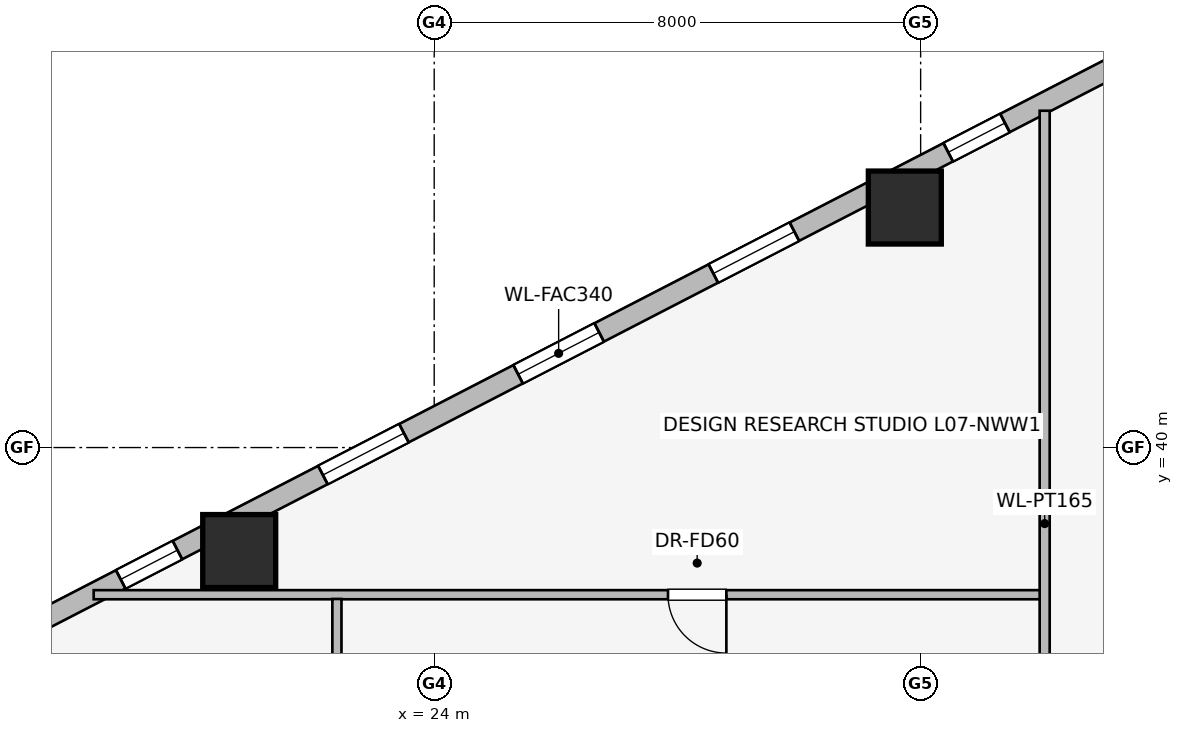
"""IFC4 building model, lengths in metres.
Left out: names, types, materials, properties, quantities, classifications, styles, units other than length and angle.
Written with IfcOpenShell. Run it as: python <this file> out.ifc"""

import sys

from ifc_helpers import new_model, si_unit, direction, frame, frame_2d, origin, origin_2d, place, context, subcontext, project, spatial, rectangle, extrude, element, fill, save


model = new_model("IFC4")
c1 = context("Model", 3, precision=1e-05, world=origin(), true_north=direction((0.0, 1.0)))
c2 = subcontext(c1, "Body", "Model", "MODEL_VIEW")
j1 = project(units=[si_unit("LENGTHUNIT", "METRE"), si_unit("PLANEANGLEUNIT", "RADIAN")], contexts=[c1])
p1 = place(None, origin())
s1 = spatial("IfcSite", under=j1, at=p1, CompositionType="ELEMENT")
p2 = place(p1, origin())
s2 = spatial("IfcBuilding", under=s1, at=p2, CompositionType="ELEMENT")
p3 = place(p2, frame((0.0, 0.0, 30.65)))
s3 = spatial("IfcBuildingStorey", under=s2, at=p3, CompositionType="ELEMENT", Elevation=30.65)
for number, where, z_axis, x_axis in (
    (1, (31.74, 43.947, 0.0), (0.0, 0.0, 1.0), (1.0, 0.0, 0.0)),
    (2, (20.793, 38.298, 0.0), (0.0, 0.0, 1.0), (1.0, 0.0, 0.0)),
):
    element("IfcColumn", number, at=place(p3, frame(where, z_axis=z_axis, x_axis=x_axis)), inside=s3, PredefinedType="COLUMN", context=c2, shape_type="SweptSolid", body=[
        extrude(rectangle(XDim=1.2, YDim=1.2, at=origin_2d()), origin(), (0.0, 0.0, 1.0), 3.65),
    ])
p4 = place(p3, frame((16.924, 36.841, 0.0), z_axis=(0.0, 0.0, 1.0), x_axis=(0.888634413993, 0.458616264721, 0.0)))
e3 = element("IfcWall", 3, at=p4, inside=s3, PredefinedType="STANDARD", context=c2, shape_type="SweptSolid", body=[
    extrude(rectangle(XDim=20.531, YDim=0.34, at=frame_2d((10.266, 0.0))), origin(), (0.0, 0.0, 1.0), 2.684),
])
p5 = place(p4, frame((2.161, 0.0, 0.75)))
e4 = element("IfcOpeningElement", 4, at=p5, cuts=e3, PredefinedType="OPENING", context=c2, shape_type="SweptSolid", body=[
    extrude(rectangle(XDim=1.05, YDim=1.4, at=frame_2d((0.525, 0.7))), frame((0.0, 0.18, 0.0), z_axis=(0.0, -1.0, 0.0), x_axis=(1.0, 0.0, 0.0)), (0.0, 0.0, 1.0), 0.36),
])
p6 = place(p4, frame((5.903, 0.0, 0.75)))
e5 = element("IfcOpeningElement", 5, at=p6, cuts=e3, PredefinedType="OPENING", context=c2, shape_type="SweptSolid", body=[
    extrude(rectangle(XDim=1.5, YDim=1.5, at=frame_2d((0.75, 0.75))), frame((0.0, 0.18, 0.0), z_axis=(0.0, -1.0, 0.0), x_axis=(1.0, 0.0, 0.0)), (0.0, 0.0, 1.0), 0.36),
])
p7 = place(p4, frame((9.516, 0.0, 0.75)))
e6 = element("IfcOpeningElement", 6, at=p7, cuts=e3, PredefinedType="OPENING", context=c2, shape_type="SweptSolid", body=[
    extrude(rectangle(XDim=1.5, YDim=1.5, at=frame_2d((0.75, 0.75))), frame((0.0, 0.18, 0.0), z_axis=(0.0, -1.0, 0.0), x_axis=(1.0, 0.0, 0.0)), (0.0, 0.0, 1.0), 0.36),
])
p8 = place(p4, frame((13.129, 0.0, 0.75)))
e7 = element("IfcOpeningElement", 7, at=p8, cuts=e3, PredefinedType="OPENING", context=c2, shape_type="SweptSolid", body=[
    extrude(rectangle(XDim=1.5, YDim=1.5, at=frame_2d((0.75, 0.75))), frame((0.0, 0.18, 0.0), z_axis=(0.0, -1.0, 0.0), x_axis=(1.0, 0.0, 0.0)), (0.0, 0.0, 1.0), 0.36),
])
p9 = place(p4, frame((17.476, 0.0, 0.75)))
e8 = element("IfcOpeningElement", 8, at=p9, cuts=e3, PredefinedType="OPENING", context=c2, shape_type="SweptSolid", body=[
    extrude(rectangle(XDim=1.05, YDim=1.4, at=frame_2d((0.525, 0.7))), frame((0.0, 0.18, 0.0), z_axis=(0.0, -1.0, 0.0), x_axis=(1.0, 0.0, 0.0)), (0.0, 0.0, 1.0), 0.36),
])
p10 = place(p3, frame((34.0, 37.58, 0.0), z_axis=(0.0, 0.0, 1.0), x_axis=(-1.0, 0.0, 0.0)))
e9 = element("IfcWall", 9, at=p10, inside=s3, PredefinedType="PARTITIONING", context=c2, shape_type="SweptSolid", body=[
    extrude(rectangle(XDim=15.6, YDim=0.15, at=frame_2d((7.8, 0.0))), origin(), (0.0, 0.0, 1.0), 3.39),
])
p11 = place(p10, frame((5.195, 0.0, 0.0)))
e10 = element("IfcOpeningElement", 10, at=p11, cuts=e9, PredefinedType="OPENING", context=c2, shape_type="SweptSolid", body=[
    extrude(rectangle(XDim=0.96, YDim=2.0, at=frame_2d((0.48, 1.0))), frame((0.0, 0.085, 0.0), z_axis=(0.0, -1.0, 0.0), x_axis=(1.0, 0.0, 0.0)), (0.0, 0.0, 1.0), 0.17),
])
p12 = place(p3, frame((34.04, 31.96, 0.0), z_axis=(0.0, 0.0, 1.0), x_axis=(0.0, 1.0, 0.0)))
e11 = element("IfcWall", 11, at=p12, inside=s3, PredefinedType="PARTITIONING", context=c2, shape_type="SweptSolid", body=[
    extrude(rectangle(XDim=13.579, YDim=0.165, at=frame_2d((6.79, 0.0))), origin(), (0.0, 0.0, 1.0), 3.39),
])
p13 = place(p3, frame((22.4, 36.08, 0.0), z_axis=(0.0, 0.0, 1.0), x_axis=(0.0, 1.0, 0.0)))
e12 = element("IfcWall", 12, at=p13, inside=s3, PredefinedType="PARTITIONING", context=c2, shape_type="SweptSolid", body=[
    extrude(rectangle(XDim=1.43, YDim=0.15, at=frame_2d((0.715, 0.0))), origin(), (0.0, 0.0, 1.0), 3.39),
])
p14 = place(p5, origin())
e13 = element("IfcWindow", 13, at=p14, inside=s3, PartitioningType="SINGLE_PANEL", PredefinedType="WINDOW", context=c2, shape_type="SweptSolid", body=[
    extrude(rectangle(XDim=1.05, YDim=1.4, at=frame_2d((0.525, 0.7))), frame((0.0, 0.03, 0.0), z_axis=(0.0, -1.0, 0.0), x_axis=(1.0, 0.0, 0.0)), (0.0, 0.0, 1.0), 0.06),
])
fill(e4, e13)
p15 = place(p6, origin())
e14 = element("IfcWindow", 14, at=p15, inside=s3, PartitioningType="SINGLE_PANEL", PredefinedType="WINDOW", context=c2, shape_type="SweptSolid", body=[
    extrude(rectangle(XDim=1.5, YDim=1.5, at=frame_2d((0.75, 0.75))), frame((0.0, 0.03, 0.0), z_axis=(0.0, -1.0, 0.0), x_axis=(1.0, 0.0, 0.0)), (0.0, 0.0, 1.0), 0.06),
])
fill(e5, e14)
p16 = place(p7, origin())
e15 = element("IfcWindow", 15, at=p16, inside=s3, PartitioningType="SINGLE_PANEL", PredefinedType="WINDOW", context=c2, shape_type="SweptSolid", body=[
    extrude(rectangle(XDim=1.5, YDim=1.5, at=frame_2d((0.75, 0.75))), frame((0.0, 0.03, 0.0), z_axis=(0.0, -1.0, 0.0), x_axis=(1.0, 0.0, 0.0)), (0.0, 0.0, 1.0), 0.06),
])
fill(e6, e15)
p17 = place(p8, origin())
e16 = element("IfcWindow", 16, at=p17, inside=s3, PartitioningType="SINGLE_PANEL", PredefinedType="WINDOW", context=c2, shape_type="SweptSolid", body=[
    extrude(rectangle(XDim=1.5, YDim=1.5, at=frame_2d((0.75, 0.75))), frame((0.0, 0.03, 0.0), z_axis=(0.0, -1.0, 0.0), x_axis=(1.0, 0.0, 0.0)), (0.0, 0.0, 1.0), 0.06),
])
fill(e7, e16)
p18 = place(p9, origin())
e17 = element("IfcWindow", 17, at=p18, inside=s3, PartitioningType="SINGLE_PANEL", PredefinedType="WINDOW", context=c2, shape_type="SweptSolid", body=[
    extrude(rectangle(XDim=1.05, YDim=1.4, at=frame_2d((0.525, 0.7))), frame((0.0, 0.03, 0.0), z_axis=(0.0, -1.0, 0.0), x_axis=(1.0, 0.0, 0.0)), (0.0, 0.0, 1.0), 0.06),
])
fill(e8, e17)
p19 = place(p11, origin())
e18 = element("IfcDoor", 18, at=p19, inside=s3, OperationType="SINGLE_SWING_LEFT", PredefinedType="DOOR", context=c2, shape_type="SweptSolid", body=[
    extrude(rectangle(XDim=0.96, YDim=2.0, at=frame_2d((0.48, 1.0))), frame((0.0, 0.025, 0.0), z_axis=(0.0, -1.0, 0.0), x_axis=(1.0, 0.0, 0.0)), (0.0, 0.0, 1.0), 0.05),
])
fill(e10, e18)
save(model, sys.argv[1])
